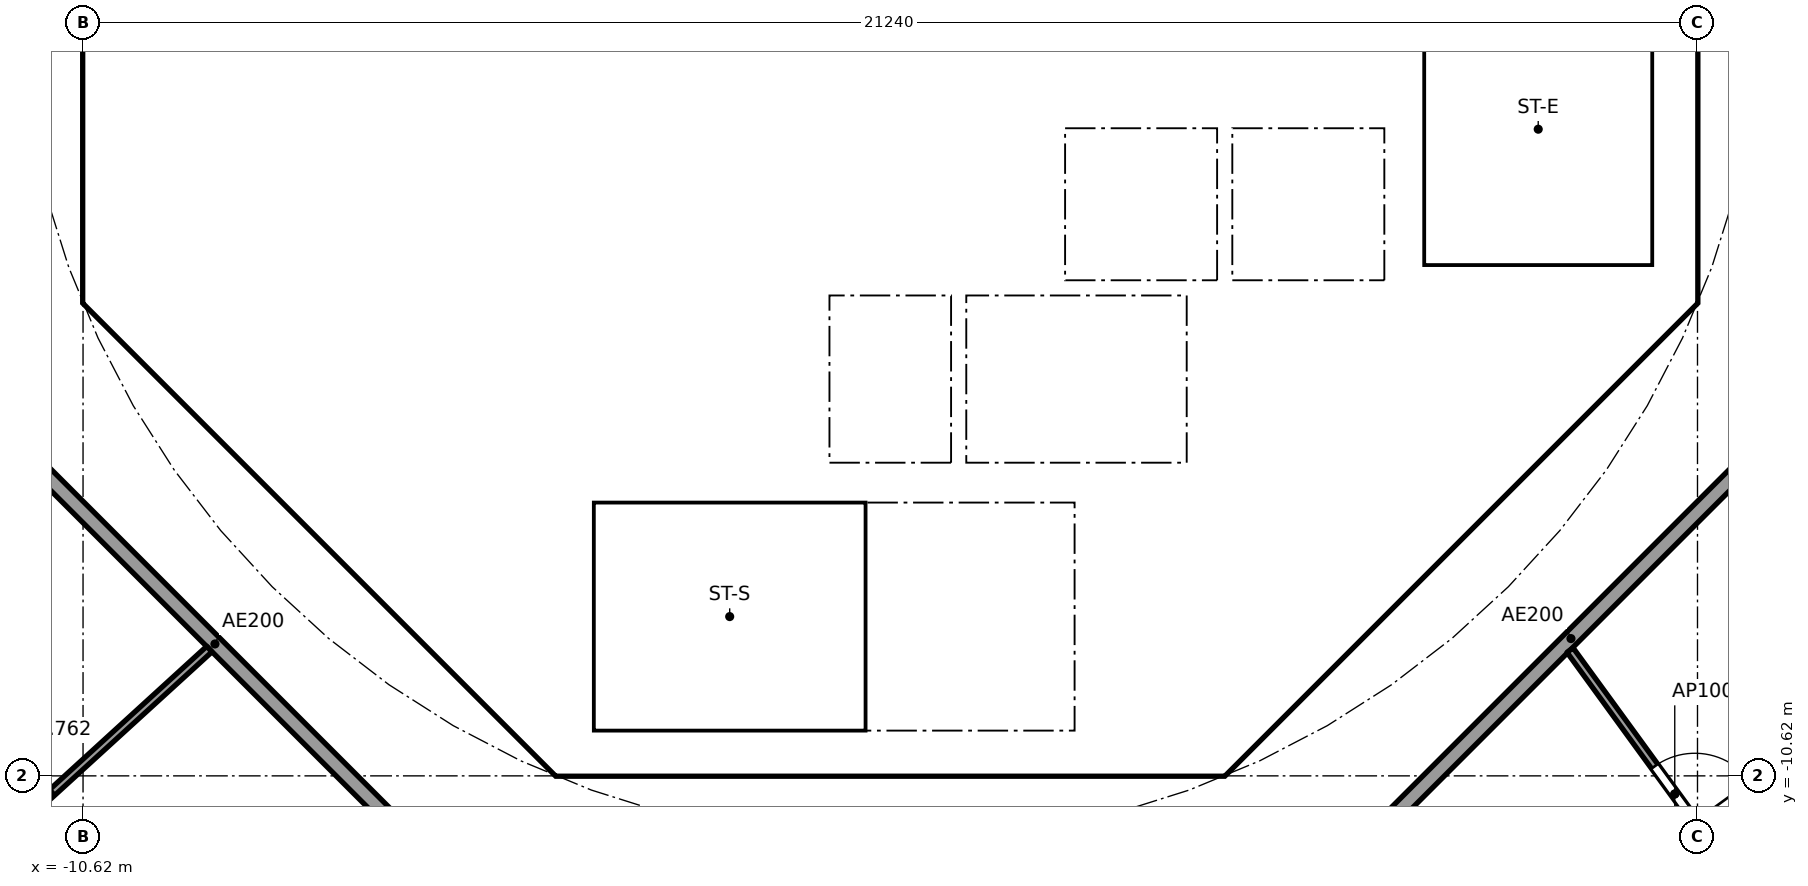
"""IFC4 building model, lengths in metres.
Left out: names, types, materials, properties, quantities, classifications, styles, units other than length and angle.
Written with IfcOpenShell. Run it as: python <this file> out.ifc"""

import sys

from ifc_helpers import new_model, si_unit, direction, frame, frame_2d, origin, place, context, subcontext, project, spatial, polyline, rectangle, outline, extrude, element, fill, save


model = new_model("IFC4")
c1 = context("Model", 3, precision=1e-05, world=origin(), true_north=direction((0.0, 1.0)))
c2 = subcontext(c1, "Body", "Model", "MODEL_VIEW")
j1 = project(units=[si_unit("LENGTHUNIT", "METRE"), si_unit("PLANEANGLEUNIT", "RADIAN")], contexts=[c1])
p1 = place(None, origin())
s1 = spatial("IfcSite", under=j1, at=p1, CompositionType="ELEMENT")
p2 = place(p1, origin())
s2 = spatial("IfcBuilding", under=s1, at=p2, CompositionType="ELEMENT")
p3 = place(p2, frame((0.0, 0.0, 277.0)))
s3 = spatial("IfcBuildingStorey", under=s2, at=p3, CompositionType="ELEMENT", Elevation=277.0)
p4 = place(p3, frame((-10.325, 3.801, 0.0), z_axis=(0.0, 0.0, 1.0), x_axis=(0.0, -1.0, 0.0)))
e1 = element("IfcWall", 1, at=p4, inside=s3, PredefinedType="SHEAR", context=c2, shape_type="SweptSolid", body=[
    extrude(rectangle(XDim=7.602, YDim=0.6, at=frame_2d((3.801, 0.0))), origin(), (0.0, 0.0, 1.0), 3.44),
])
p5 = place(p4, frame((0.651, 0.0, 0.0)))
e2 = element("IfcOpeningElement", 2, at=p5, cuts=e1, PredefinedType="OPENING", context=c2, shape_type="SweptSolid", body=[
    extrude(rectangle(XDim=1.5, YDim=2.1, at=frame_2d((0.75, 1.05))), frame((0.0, 0.31, 0.0), z_axis=(0.0, -1.0, 0.0), x_axis=(1.0, 0.0, 0.0)), (0.0, 0.0, 1.0), 0.62),
])
p6 = place(p4, frame((5.451, 0.0, 0.0)))
e3 = element("IfcOpeningElement", 3, at=p6, cuts=e1, PredefinedType="OPENING", context=c2, shape_type="SweptSolid", body=[
    extrude(rectangle(XDim=1.5, YDim=2.1, at=frame_2d((0.75, 1.05))), frame((0.0, 0.31, 0.0), z_axis=(0.0, -1.0, 0.0), x_axis=(1.0, 0.0, 0.0)), (0.0, 0.0, 1.0), 0.62),
])
p7 = place(p3, frame((-9.988, -4.613, 0.0), z_axis=(0.0, 0.0, 1.0), x_axis=(0.707106781187, -0.707106781187, 0.0)))
e4 = element("IfcWall", 4, at=p7, inside=s3, PredefinedType="SHEAR", context=c2, shape_type="SweptSolid", body=[
    extrude(rectangle(XDim=7.602, YDim=0.6, at=frame_2d((3.801, 0.0))), origin(), (0.0, 0.0, 1.0), 3.44),
])
p8 = place(p7, frame((6.151, 0.0, 0.0)))
e5 = element("IfcOpeningElement", 5, at=p8, cuts=e4, PredefinedType="OPENING", context=c2, shape_type="SweptSolid", body=[
    extrude(rectangle(XDim=1.1, YDim=2.1, at=frame_2d((0.55, 1.05))), frame((0.0, 0.31, 0.0), z_axis=(0.0, -1.0, 0.0), x_axis=(1.0, 0.0, 0.0)), (0.0, 0.0, 1.0), 0.62),
])
p9 = place(p3, frame((4.613, -9.988, 0.0), z_axis=(0.0, 0.0, 1.0), x_axis=(0.707106781187, 0.707106781187, 0.0)))
e6 = element("IfcWall", 6, at=p9, inside=s3, PredefinedType="SHEAR", context=c2, shape_type="SweptSolid", body=[
    extrude(rectangle(XDim=7.602, YDim=0.6, at=frame_2d((3.801, 0.0))), origin(), (0.0, 0.0, 1.0), 3.44),
])
p10 = place(p9, frame((3.201, 0.0, 0.0)))
e7 = element("IfcOpeningElement", 7, at=p10, cuts=e6, PredefinedType="OPENING", context=c2, shape_type="SweptSolid", body=[
    extrude(rectangle(XDim=1.2, YDim=2.1, at=frame_2d((0.6, 1.05))), frame((0.0, 0.31, 0.0), z_axis=(0.0, -1.0, 0.0), x_axis=(1.0, 0.0, 0.0)), (0.0, 0.0, 1.0), 0.62),
])
p11 = place(p3, frame((4.0, -10.025, 0.0), z_axis=(0.0, 0.0, 1.0), x_axis=(0.0, 1.0, 0.0)))
e8 = element("IfcWall", 8, at=p11, inside=s3, PredefinedType="SOLIDWALL", context=c2, shape_type="SweptSolid", body=[
    extrude(rectangle(XDim=3.0, YDim=0.2, at=frame_2d((1.5, 0.0))), origin(), (0.0, 0.0, 1.0), 3.44),
])
p12 = place(p11, frame((0.975, 0.0, 0.0)))
e9 = element("IfcOpeningElement", 9, at=p12, cuts=e8, PredefinedType="OPENING", context=c2, shape_type="SweptSolid", body=[
    extrude(rectangle(XDim=1.1, YDim=2.1, at=frame_2d((0.55, 1.05))), frame((0.0, 0.11, 0.0), z_axis=(0.0, -1.0, 0.0), x_axis=(1.0, 0.0, 0.0)), (0.0, 0.0, 1.0), 0.22),
])
p13 = place(p3, frame((-6.2, -7.827, 0.0), z_axis=(0.0, 0.0, 1.0), x_axis=(0.0, 1.0, 0.0)))
e10 = element("IfcWall", 10, at=p13, inside=s3, PredefinedType="PARTITIONING", context=c2, shape_type="SweptSolid", body=[
    extrude(rectangle(XDim=3.527, YDim=0.15, at=frame_2d((1.763, 0.0))), origin(), (0.0, 0.0, 1.0), 3.44),
])
p14 = place(p13, frame((2.365, 0.0, 0.0)))
e11 = element("IfcOpeningElement", 11, at=p14, cuts=e10, PredefinedType="OPENING", context=c2, shape_type="SweptSolid", body=[
    extrude(rectangle(XDim=0.9, YDim=2.1, at=frame_2d((0.45, 1.05))), frame((0.0, 0.085, 0.0), z_axis=(0.0, -1.0, 0.0), x_axis=(1.0, 0.0, 0.0)), (0.0, 0.0, 1.0), 0.17),
])
p15 = place(p13, frame((0.489, 0.0, 0.0)))
e12 = element("IfcOpeningElement", 12, at=p15, cuts=e10, PredefinedType="OPENING", context=c2, shape_type="SweptSolid", body=[
    extrude(rectangle(XDim=0.9, YDim=2.1, at=frame_2d((0.45, 1.05))), frame((0.0, 0.085, 0.0), z_axis=(0.0, -1.0, 0.0), x_axis=(1.0, 0.0, 0.0)), (0.0, 0.0, 1.0), 0.17),
])
p16 = place(p3, frame((4.0, -6.5, 0.0), z_axis=(0.0, 0.0, 1.0), x_axis=(0.0, 1.0, 0.0)))
e13 = element("IfcWall", 13, at=p16, inside=s3, PredefinedType="SOLIDWALL", context=c2, shape_type="SweptSolid", body=[
    extrude(rectangle(XDim=2.2, YDim=0.2, at=frame_2d((1.1, 0.0))), origin(), (0.0, 0.0, 1.0), 3.44),
])
p17 = place(p16, frame((0.55, 0.0, 0.0)))
e14 = element("IfcOpeningElement", 14, at=p17, cuts=e13, PredefinedType="OPENING", context=c2, shape_type="SweptSolid", body=[
    extrude(rectangle(XDim=1.1, YDim=2.1, at=frame_2d((0.55, 1.05))), frame((0.0, 0.11, 0.0), z_axis=(0.0, -1.0, 0.0), x_axis=(1.0, 0.0, 0.0)), (0.0, 0.0, 1.0), 0.22),
])
p18 = place(p3, frame((-4.0, -6.5, 0.0), z_axis=(0.0, 0.0, 1.0), x_axis=(0.0, 1.0, 0.0)))
e15 = element("IfcWall", 15, at=p18, inside=s3, PredefinedType="SOLIDWALL", context=c2, shape_type="SweptSolid", body=[
    extrude(rectangle(XDim=2.2, YDim=0.2, at=frame_2d((1.1, 0.0))), origin(), (0.0, 0.0, 1.0), 3.44),
])
p19 = place(p18, frame((0.65, 0.0, 0.0)))
e16 = element("IfcOpeningElement", 16, at=p19, cuts=e15, PredefinedType="OPENING", context=c2, shape_type="SweptSolid", body=[
    extrude(rectangle(XDim=0.9, YDim=2.1, at=frame_2d((0.45, 1.05))), frame((0.0, 0.11, 0.0), z_axis=(0.0, -1.0, 0.0), x_axis=(1.0, 0.0, 0.0)), (0.0, 0.0, 1.0), 0.22),
])
p20 = place(p3, frame((-6.7, -2.0, 0.0), z_axis=(0.0, 0.0, 1.0), x_axis=(1.0, 0.0, 0.0)))
e17 = element("IfcWall", 17, at=p20, inside=s3, PredefinedType="SOLIDWALL", context=c2, shape_type="SweptSolid", body=[
    extrude(rectangle(XDim=13.4, YDim=0.2, at=frame_2d((6.7, 0.0))), origin(), (0.0, 0.0, 1.0), 3.44),
])
p21 = place(p20, frame((9.45, 0.0, 0.0)))
e18 = element("IfcOpeningElement", 18, at=p21, cuts=e17, PredefinedType="OPENING", context=c2, shape_type="SweptSolid", body=[
    extrude(rectangle(XDim=1.1, YDim=2.1, at=frame_2d((0.55, 1.05))), frame((0.0, 0.11, 0.0), z_axis=(0.0, -1.0, 0.0), x_axis=(1.0, 0.0, 0.0)), (0.0, 0.0, 1.0), 0.22),
])
p22 = place(p20, frame((11.65, 0.0, 0.0)))
e19 = element("IfcOpeningElement", 19, at=p22, cuts=e17, PredefinedType="OPENING", context=c2, shape_type="SweptSolid", body=[
    extrude(rectangle(XDim=1.1, YDim=2.1, at=frame_2d((0.55, 1.05))), frame((0.0, 0.11, 0.0), z_axis=(0.0, -1.0, 0.0), x_axis=(1.0, 0.0, 0.0)), (0.0, 0.0, 1.0), 0.22),
])
p23 = place(p20, frame((1.85, 0.0, 0.0)))
e20 = element("IfcOpeningElement", 20, at=p23, cuts=e17, PredefinedType="OPENING", context=c2, shape_type="SweptSolid", body=[
    extrude(rectangle(XDim=0.9, YDim=2.1, at=frame_2d((0.45, 1.05))), frame((0.0, 0.11, 0.0), z_axis=(0.0, -1.0, 0.0), x_axis=(1.0, 0.0, 0.0)), (0.0, 0.0, 1.0), 0.22),
])
p24 = place(p20, frame((5.15, 0.0, 0.0)))
e21 = element("IfcOpeningElement", 21, at=p24, cuts=e17, PredefinedType="OPENING", context=c2, shape_type="SweptSolid", body=[
    extrude(rectangle(XDim=0.9, YDim=2.1, at=frame_2d((0.45, 1.05))), frame((0.0, 0.11, 0.0), z_axis=(0.0, -1.0, 0.0), x_axis=(1.0, 0.0, 0.0)), (0.0, 0.0, 1.0), 0.22),
])
p25 = place(p20, frame((7.35, 0.0, 0.0)))
e22 = element("IfcOpeningElement", 22, at=p25, cuts=e17, PredefinedType="OPENING", context=c2, shape_type="SweptSolid", body=[
    extrude(rectangle(XDim=0.9, YDim=2.1, at=frame_2d((0.45, 1.05))), frame((0.0, 0.11, 0.0), z_axis=(0.0, -1.0, 0.0), x_axis=(1.0, 0.0, 0.0)), (0.0, 0.0, 1.0), 0.22),
])
p26 = place(p3, origin())
e23 = element("IfcWall", 23, at=p26, inside=s3, PredefinedType="SHEAR", context=c2, shape_type="SweptSolid", body=[
    extrude(outline(polyline([(-10.625, -3.801), (-10.025, -3.801), (-10.025, -4.152), (-9.776, -4.401), (-10.2, -4.825), (-10.625, -4.401), (-10.625, -3.801)])), origin(), (0.0, 0.0, 1.0), 3.44),
])
p27 = place(p3, origin())
e24 = element("IfcWall", 24, at=p27, inside=s3, PredefinedType="SHEAR", context=c2, shape_type="SweptSolid", body=[
    extrude(outline(polyline([(-4.152, -10.025), (4.152, -10.025), (4.401, -9.776), (4.825, -10.2), (4.401, -10.625), (-4.401, -10.625), (-4.825, -10.2), (-4.401, -9.776), (-4.152, -10.025)])), origin(), (0.0, 0.0, 1.0), 3.44),
])
p28 = place(p3, origin())
e25 = element("IfcWall", 25, at=p28, inside=s3, PredefinedType="SHEAR", context=c2, shape_type="SweptSolid", body=[
    extrude(outline(polyline([(9.776, -4.401), (10.025, -4.152), (10.025, -3.801), (10.025, 4.152), (9.776, 4.401), (10.2, 4.825), (10.625, 4.401), (10.625, -4.401), (10.2, -4.825), (9.776, -4.401)])), origin(), (0.0, 0.0, 1.0), 3.44),
])
p29 = place(p3, frame((-10.025, -4.0, 0.0), z_axis=(0.0, 0.0, 1.0), x_axis=(1.0, 0.0, 0.0)))
e26 = element("IfcWall", 26, at=p29, inside=s3, PredefinedType="PARTITIONING", context=c2, shape_type="SweptSolid", body=[
    extrude(rectangle(XDim=3.325, YDim=0.2, at=frame_2d((1.662, 0.0))), origin(), (0.0, 0.0, 1.0), 3.44),
])
p30 = place(p3, frame((-8.301, -5.8, 0.0), z_axis=(0.0, 0.0, 1.0), x_axis=(1.0, 0.0, 0.0)))
e27 = element("IfcWall", 27, at=p30, inside=s3, PredefinedType="PARTITIONING", context=c2, shape_type="SweptSolid", body=[
    extrude(rectangle(XDim=2.026, YDim=0.15, at=frame_2d((1.013, 0.0))), origin(), (0.0, 0.0, 1.0), 3.44),
])
for number, where, z_axis, x_axis in (
    (28, (-0.9, -6.5, 0.0), (0.0, 0.0, 1.0), (0.0, 1.0, 0.0)),
    (29, (0.9, -6.5, 0.0), (0.0, 0.0, 1.0), (0.0, 1.0, 0.0)),
):
    element("IfcWall", number, at=place(p3, frame(where, z_axis=z_axis, x_axis=x_axis)), inside=s3, PredefinedType="SOLIDWALL", context=c2, shape_type="SweptSolid", body=[
        extrude(rectangle(XDim=2.2, YDim=0.2, at=frame_2d((1.1, 0.0))), origin(), (0.0, 0.0, 1.0), 3.44),
    ])
p31 = place(p3, origin())
e30 = element("IfcWall", 30, at=p31, inside=s3, PredefinedType="SOLIDWALL", context=c2, shape_type="SweptSolid", body=[
    extrude(outline(polyline([(-6.7, -2.1), (-6.5, -2.1), (-6.5, -4.1), (-2.3, -4.1), (-2.3, -2.1), (-2.1, -2.1), (-2.1, -4.1), (-0.1, -4.1), (-0.1, -2.1), (0.1, -2.1), (0.1, -4.1), (2.1, -4.1), (2.1, -2.1), (2.3, -2.1), (2.3, -4.1), (4.3, -4.1), (4.3, -2.1), (4.5, -2.1), (4.5, -4.1), (6.5, -4.1), (6.5, -2.1), (6.7, -2.1), (6.7, -4.3), (-6.7, -4.3), (-6.7, -2.1)])), origin(), (0.0, 0.0, 1.0), 3.44),
])
p32 = place(p3, origin())
e31 = element("IfcWall", 31, at=p32, inside=s3, PredefinedType="SOLIDWALL", context=c2, shape_type="SweptSolid", body=[
    extrude(outline(polyline([(-3.9, -10.025), (-4.1, -10.025), (-4.1, -7.025), (-3.9, -7.025), (-3.9, -10.025)])), origin(), (0.0, 0.0, 1.0), 3.44),
])
p33 = place(p3, origin())
e32 = element("IfcWall", 32, at=p33, inside=s3, PredefinedType="SOLIDWALL", context=c2, shape_type="SweptSolid", body=[
    extrude(outline(polyline([(4.1, -7.025), (-4.1, -7.025), (-4.1, -6.5), (4.1, -6.5), (4.1, -7.025)])), origin(), (0.0, 0.0, 1.0), 3.44),
])
p34 = place(p3, origin())
e33 = element("IfcWall", 33, at=p34, inside=s3, PredefinedType="SOLIDWALL", context=c2, shape_type="SweptSolid", body=[
    extrude(outline(polyline([(7.025, -3.9), (6.7, -3.9), (6.7, 3.9), (7.025, 3.9), (7.025, -3.9)])), origin(), (0.0, 0.0, 1.0), 3.44),
])
p35 = place(p3, origin())
e34 = element("IfcWall", 34, at=p35, inside=s3, PredefinedType="SOLIDWALL", context=c2, shape_type="SweptSolid", body=[
    extrude(outline(polyline([(10.025, -4.1), (6.7, -4.1), (6.7, -3.9), (10.025, -3.9), (10.025, -4.1)])), origin(), (0.0, 0.0, 1.0), 3.44),
])
p36 = place(p3, frame((-12.635, -5.134, 0.0), z_axis=(0.0, 0.0, 1.0), x_axis=(0.707106781187, -0.707106781187, 0.0)))
e35 = element("IfcWall", 35, at=p36, inside=s3, PredefinedType="PARTITIONING", context=c2, shape_type="SweptSolid", body=[
    extrude(rectangle(XDim=10.609, YDim=0.2, at=frame_2d((5.305, 0.0))), origin(), (0.0, 0.0, 1.0), 3.44),
])
p37 = place(p3, frame((5.275, -12.494, 0.0), z_axis=(0.0, 0.0, 1.0), x_axis=(0.707106781187, 0.707106781187, 0.0)))
e36 = element("IfcWall", 36, at=p37, inside=s3, PredefinedType="PARTITIONING", context=c2, shape_type="SweptSolid", body=[
    extrude(rectangle(XDim=10.409, YDim=0.2, at=frame_2d((5.205, 0.0))), origin(), (0.0, 0.0, 1.0), 3.44),
])
p38 = place(p3, frame((-8.958, -8.952, 0.0), z_axis=(0.0, 0.0, 1.0), x_axis=(-0.73876526954, -0.673962815385, 0.0)))
e37 = element("IfcWall", 37, at=p38, inside=s3, PredefinedType="PARTITIONING", context=c2, shape_type="SweptSolid", body=[
    extrude(rectangle(XDim=5.647, YDim=0.1, at=frame_2d((2.824, 0.0))), origin(), (0.0, 0.0, 1.0), 2.762),
])
p39 = place(p3, frame((10.304, -14.555, 0.0), z_axis=(0.0, 0.0, 1.0), x_axis=(0.628170338674, 0.778075848237, 0.0)))
e38 = element("IfcWall", 38, at=p39, inside=s3, PredefinedType="PARTITIONING", context=c2, shape_type="SweptSolid", body=[
    extrude(rectangle(XDim=4.532, YDim=0.1, at=frame_2d((2.266, 0.0))), origin(), (0.0, 0.0, 1.0), 2.905),
])
p40 = place(p39, frame((0.683, 0.0, 0.0)))
e39 = element("IfcOpeningElement", 39, at=p40, cuts=e38, PredefinedType="OPENING", context=c2, shape_type="SweptSolid", body=[
    extrude(rectangle(XDim=0.9, YDim=2.1, at=frame_2d((0.45, 1.05))), frame((0.0, 0.06, 0.0), z_axis=(0.0, -1.0, 0.0), x_axis=(1.0, 0.0, 0.0)), (0.0, 0.0, 1.0), 0.12),
])
p41 = place(p3, frame((8.943, -8.966, 0.0), z_axis=(0.0, 0.0, 1.0), x_axis=(0.588357698232, -0.808600778463, 0.0)))
e40 = element("IfcWall", 40, at=p41, inside=s3, PredefinedType="PARTITIONING", context=c2, shape_type="SweptSolid", body=[
    extrude(rectangle(XDim=4.682, YDim=0.1, at=frame_2d((2.341, 0.0))), origin(), (0.0, 0.0, 1.0), 2.762),
])
p42 = place(p41, frame((1.891, 0.0, 0.0)))
e41 = element("IfcOpeningElement", 41, at=p42, cuts=e40, PredefinedType="OPENING", context=c2, shape_type="SweptSolid", body=[
    extrude(rectangle(XDim=0.9, YDim=2.1, at=frame_2d((0.45, 1.05))), frame((0.0, 0.06, 0.0), z_axis=(0.0, -1.0, 0.0), x_axis=(1.0, 0.0, 0.0)), (0.0, 0.0, 1.0), 0.12),
])
p43 = place(p21, origin())
e42 = element("IfcDoor", 42, at=p43, inside=s3, OperationType="DOUBLE_DOOR_SLIDING", PredefinedType="DOOR", context=c2, shape_type="SweptSolid", body=[
    extrude(rectangle(XDim=1.1, YDim=2.1, at=frame_2d((0.55, 1.05))), frame((0.0, 0.025, 0.0), z_axis=(0.0, -1.0, 0.0), x_axis=(1.0, 0.0, 0.0)), (0.0, 0.0, 1.0), 0.05),
])
fill(e18, e42)
p44 = place(p22, origin())
e43 = element("IfcDoor", 43, at=p44, inside=s3, OperationType="DOUBLE_DOOR_SLIDING", PredefinedType="DOOR", context=c2, shape_type="SweptSolid", body=[
    extrude(rectangle(XDim=1.1, YDim=2.1, at=frame_2d((0.55, 1.05))), frame((0.0, 0.025, 0.0), z_axis=(0.0, -1.0, 0.0), x_axis=(1.0, 0.0, 0.0)), (0.0, 0.0, 1.0), 0.05),
])
fill(e19, e43)
p45 = place(p17, origin())
e44 = element("IfcDoor", 44, at=p45, inside=s3, OperationType="DOUBLE_DOOR_SLIDING", PredefinedType="DOOR", context=c2, shape_type="SweptSolid", body=[
    extrude(rectangle(XDim=1.1, YDim=2.1, at=frame_2d((0.55, 1.05))), frame((0.0, 0.025, 0.0), z_axis=(0.0, -1.0, 0.0), x_axis=(1.0, 0.0, 0.0)), (0.0, 0.0, 1.0), 0.05),
])
fill(e14, e44)
p46 = place(p12, origin())
e45 = element("IfcDoor", 45, at=p46, inside=s3, OperationType="SINGLE_SWING_RIGHT", PredefinedType="DOOR", context=c2, shape_type="SweptSolid", body=[
    extrude(rectangle(XDim=1.1, YDim=2.1, at=frame_2d((0.55, 1.05))), frame((0.0, 0.025, 0.0), z_axis=(0.0, -1.0, 0.0), x_axis=(1.0, 0.0, 0.0)), (0.0, 0.0, 1.0), 0.05),
])
fill(e9, e45)
p47 = place(p14, origin())
e46 = element("IfcDoor", 46, at=p47, inside=s3, OperationType="SINGLE_SWING_RIGHT", PredefinedType="DOOR", context=c2, shape_type="SweptSolid", body=[
    extrude(rectangle(XDim=0.9, YDim=2.1, at=frame_2d((0.45, 1.05))), frame((0.0, 0.025, 0.0), z_axis=(0.0, -1.0, 0.0), x_axis=(1.0, 0.0, 0.0)), (0.0, 0.0, 1.0), 0.05),
])
fill(e11, e46)
p48 = place(p15, origin())
e47 = element("IfcDoor", 47, at=p48, inside=s3, OperationType="SINGLE_SWING_RIGHT", PredefinedType="DOOR", context=c2, shape_type="SweptSolid", body=[
    extrude(rectangle(XDim=0.9, YDim=2.1, at=frame_2d((0.45, 1.05))), frame((0.0, 0.025, 0.0), z_axis=(0.0, -1.0, 0.0), x_axis=(1.0, 0.0, 0.0)), (0.0, 0.0, 1.0), 0.05),
])
fill(e12, e47)
p49 = place(p19, frame((0.9, 0.0, 0.0), x_axis=(-1.0, 0.0, 0.0)))
e48 = element("IfcDoor", 48, at=p49, inside=s3, OperationType="SINGLE_SWING_RIGHT", PredefinedType="DOOR", context=c2, shape_type="SweptSolid", body=[
    extrude(rectangle(XDim=0.9, YDim=2.1, at=frame_2d((0.45, 1.05))), frame((0.0, 0.025, 0.0), z_axis=(0.0, -1.0, 0.0), x_axis=(1.0, 0.0, 0.0)), (0.0, 0.0, 1.0), 0.05),
])
fill(e16, e48)
p50 = place(p23, frame((0.9, 0.0, 0.0), x_axis=(-1.0, 0.0, 0.0)))
e49 = element("IfcDoor", 49, at=p50, inside=s3, OperationType="SINGLE_SWING_RIGHT", PredefinedType="DOOR", context=c2, shape_type="SweptSolid", body=[
    extrude(rectangle(XDim=0.9, YDim=2.1, at=frame_2d((0.45, 1.05))), frame((0.0, 0.025, 0.0), z_axis=(0.0, -1.0, 0.0), x_axis=(1.0, 0.0, 0.0)), (0.0, 0.0, 1.0), 0.05),
])
fill(e20, e49)
p51 = place(p24, frame((0.9, 0.0, 0.0), x_axis=(-1.0, 0.0, 0.0)))
e50 = element("IfcDoor", 50, at=p51, inside=s3, OperationType="SINGLE_SWING_RIGHT", PredefinedType="DOOR", context=c2, shape_type="SweptSolid", body=[
    extrude(rectangle(XDim=0.9, YDim=2.1, at=frame_2d((0.45, 1.05))), frame((0.0, 0.025, 0.0), z_axis=(0.0, -1.0, 0.0), x_axis=(1.0, 0.0, 0.0)), (0.0, 0.0, 1.0), 0.05),
])
fill(e21, e50)
p52 = place(p25, frame((0.9, 0.0, 0.0), x_axis=(-1.0, 0.0, 0.0)))
e51 = element("IfcDoor", 51, at=p52, inside=s3, OperationType="SINGLE_SWING_RIGHT", PredefinedType="DOOR", context=c2, shape_type="SweptSolid", body=[
    extrude(rectangle(XDim=0.9, YDim=2.1, at=frame_2d((0.45, 1.05))), frame((0.0, 0.025, 0.0), z_axis=(0.0, -1.0, 0.0), x_axis=(1.0, 0.0, 0.0)), (0.0, 0.0, 1.0), 0.05),
])
fill(e22, e51)
p53 = place(p10, origin())
e52 = element("IfcDoor", 52, at=p53, inside=s3, OperationType="SINGLE_SWING_RIGHT", PredefinedType="DOOR", context=c2, shape_type="SweptSolid", body=[
    extrude(rectangle(XDim=1.2, YDim=2.1, at=frame_2d((0.6, 1.05))), frame((0.0, 0.025, 0.0), z_axis=(0.0, -1.0, 0.0), x_axis=(1.0, 0.0, 0.0)), (0.0, 0.0, 1.0), 0.05),
])
fill(e7, e52)
p54 = place(p6, origin())
e53 = element("IfcDoor", 53, at=p54, inside=s3, OperationType="DOUBLE_DOOR_SINGLE_SWING", PredefinedType="DOOR", context=c2, shape_type="SweptSolid", body=[
    extrude(rectangle(XDim=1.5, YDim=2.1, at=frame_2d((0.75, 1.05))), frame((0.0, 0.025, 0.0), z_axis=(0.0, -1.0, 0.0), x_axis=(1.0, 0.0, 0.0)), (0.0, 0.0, 1.0), 0.05),
])
fill(e3, e53)
p55 = place(p8, origin())
e54 = element("IfcDoor", 54, at=p55, inside=s3, OperationType="SINGLE_SWING_RIGHT", PredefinedType="DOOR", context=c2, shape_type="SweptSolid", body=[
    extrude(rectangle(XDim=1.1, YDim=2.1, at=frame_2d((0.55, 1.05))), frame((0.0, 0.025, 0.0), z_axis=(0.0, -1.0, 0.0), x_axis=(1.0, 0.0, 0.0)), (0.0, 0.0, 1.0), 0.05),
])
fill(e5, e54)
p56 = place(p42, origin())
e55 = element("IfcDoor", 55, at=p56, inside=s3, OperationType="SINGLE_SWING_RIGHT", PredefinedType="DOOR", context=c2, shape_type="SweptSolid", body=[
    extrude(rectangle(XDim=0.9, YDim=2.1, at=frame_2d((0.45, 1.05))), frame((0.0, 0.025, 0.0), z_axis=(0.0, -1.0, 0.0), x_axis=(1.0, 0.0, 0.0)), (0.0, 0.0, 1.0), 0.05),
])
fill(e41, e55)
save(model, sys.argv[1])
